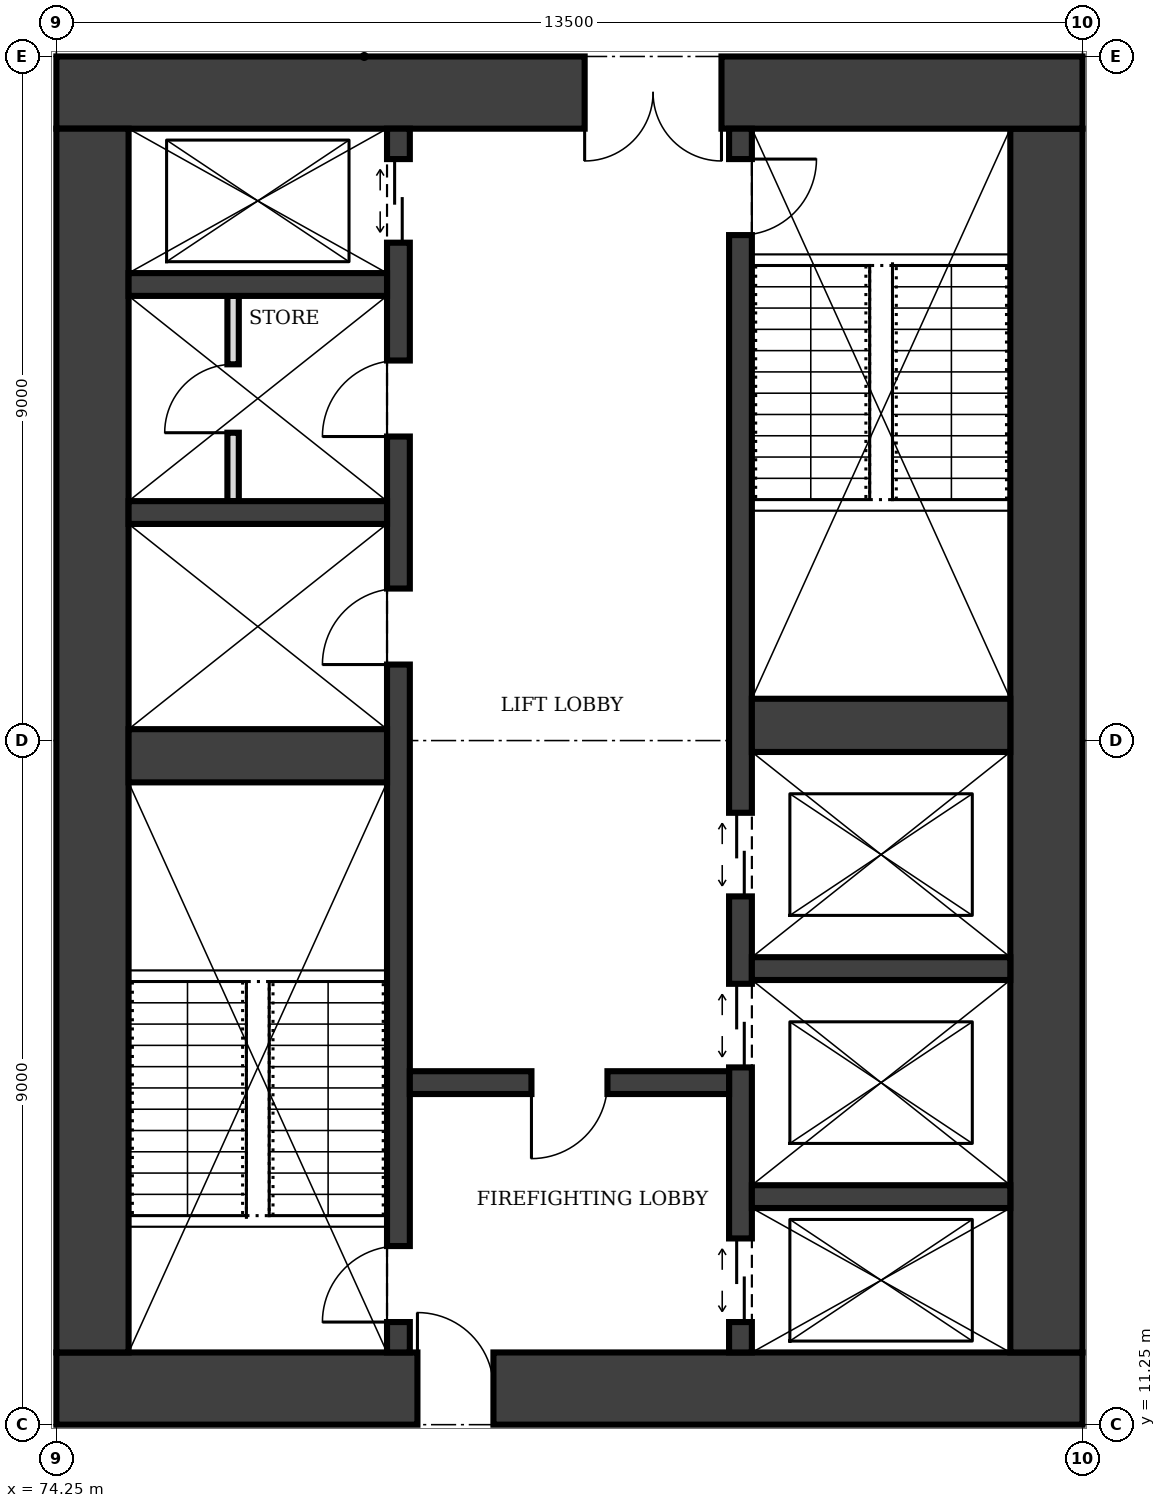
"""IFC4 building model, lengths in metres.
Left out: names, types, materials, properties, quantities, classifications, styles, units other than length and angle.
Written with IfcOpenShell. Run it as: python <this file> out.ifc"""

import sys

from ifc_helpers import new_model, si_unit, direction, frame, frame_2d, origin, place, context, subcontext, project, spatial, rectangle, extrude, element, fill, save


model = new_model("IFC4")
c1 = context("Model", 3, precision=1e-05, world=origin(), true_north=direction((0.0, 1.0)))
c2 = subcontext(c1, "Body", "Model", "MODEL_VIEW")
j1 = project(units=[si_unit("LENGTHUNIT", "METRE"), si_unit("PLANEANGLEUNIT", "RADIAN")], contexts=[c1])
p1 = place(None, origin())
s1 = spatial("IfcSite", under=j1, at=p1, CompositionType="ELEMENT")
p2 = place(p1, origin())
s2 = spatial("IfcBuilding", under=s1, at=p2, CompositionType="ELEMENT")
p3 = place(p2, frame((0.0, 0.0, 213.0)))
s3 = spatial("IfcBuildingStorey", under=s2, at=p3, CompositionType="ELEMENT", Elevation=213.0)
p4 = place(p3, frame((74.25, 11.725, 0.0), z_axis=(0.0, 0.0, 1.0), x_axis=(1.0, 0.0, 0.0)))
e1 = element("IfcWall", 1, at=p4, inside=s3, PredefinedType="SHEAR", context=c2, shape_type="SweptSolid", body=[
    extrude(rectangle(XDim=13.5, YDim=0.95, at=frame_2d((6.75, 0.0))), origin(), (0.0, 0.0, 1.0), 4.0),
])
p5 = place(p4, frame((4.75, 0.0, 0.0)))
e2 = element("IfcOpeningElement", 2, at=p5, cuts=e1, PredefinedType="OPENING", context=c2, shape_type="SweptSolid", body=[
    extrude(rectangle(XDim=1.0, YDim=2.1, at=frame_2d((0.5, 1.05))), frame((0.0, 0.485, 0.0), z_axis=(0.0, -1.0, 0.0), x_axis=(1.0, 0.0, 0.0)), (0.0, 0.0, 1.0), 0.97),
])
p6 = place(p3, frame((87.275, 12.2, 0.0), z_axis=(0.0, 0.0, 1.0), x_axis=(0.0, 1.0, 0.0)))
e3 = element("IfcWall", 3, at=p6, inside=s3, PredefinedType="SHEAR", context=c2, shape_type="SweptSolid", body=[
    extrude(rectangle(XDim=16.1, YDim=0.95, at=frame_2d((8.05, 0.0))), origin(), (0.0, 0.0, 1.0), 4.0),
])
p7 = place(p3, frame((87.75, 28.775, 0.0), z_axis=(0.0, 0.0, 1.0), x_axis=(-1.0, 0.0, 0.0)))
e4 = element("IfcWall", 4, at=p7, inside=s3, PredefinedType="SHEAR", context=c2, shape_type="SweptSolid", body=[
    extrude(rectangle(XDim=13.5, YDim=0.95, at=frame_2d((6.75, 0.0))), origin(), (0.0, 0.0, 1.0), 4.0),
])
p8 = place(p7, frame((4.75, 0.0, 0.0)))
e5 = element("IfcOpeningElement", 5, at=p8, cuts=e4, PredefinedType="OPENING", context=c2, shape_type="SweptSolid", body=[
    extrude(rectangle(XDim=1.8, YDim=2.1, at=frame_2d((0.9, 1.05))), frame((0.0, 0.485, 0.0), z_axis=(0.0, -1.0, 0.0), x_axis=(1.0, 0.0, 0.0)), (0.0, 0.0, 1.0), 0.97),
])
p9 = place(p3, frame((74.725, 28.3, 0.0), z_axis=(0.0, 0.0, 1.0), x_axis=(0.0, -1.0, 0.0)))
e6 = element("IfcWall", 6, at=p9, inside=s3, PredefinedType="SHEAR", context=c2, shape_type="SweptSolid", body=[
    extrude(rectangle(XDim=16.1, YDim=0.95, at=frame_2d((8.05, 0.0))), origin(), (0.0, 0.0, 1.0), 4.0),
])
p10 = place(p3, frame((78.75, 12.2, 0.0), z_axis=(0.0, 0.0, 1.0), x_axis=(0.0, 1.0, 0.0)))
e7 = element("IfcWall", 7, at=p10, inside=s3, PredefinedType="SHEAR", context=c2, shape_type="SweptSolid", body=[
    extrude(rectangle(XDim=16.1, YDim=0.3, at=frame_2d((8.05, 0.0))), origin(), (0.0, 0.0, 1.0), 4.0),
])
p11 = place(p10, frame((0.4, 0.0, 0.0)))
e8 = element("IfcOpeningElement", 8, at=p11, cuts=e7, PredefinedType="OPENING", context=c2, shape_type="SweptSolid", body=[
    extrude(rectangle(XDim=1.0, YDim=2.1, at=frame_2d((0.5, 1.05))), frame((0.0, 0.16, 0.0), z_axis=(0.0, -1.0, 0.0), x_axis=(1.0, 0.0, 0.0)), (0.0, 0.0, 1.0), 0.32),
])
p12 = place(p10, frame((14.6, 0.0, 0.0)))
e9 = element("IfcOpeningElement", 9, at=p12, cuts=e7, PredefinedType="OPENING", context=c2, shape_type="SweptSolid", body=[
    extrude(rectangle(XDim=1.1, YDim=2.1, at=frame_2d((0.55, 1.05))), frame((0.0, 0.16, 0.0), z_axis=(0.0, -1.0, 0.0), x_axis=(1.0, 0.0, 0.0)), (0.0, 0.0, 1.0), 0.32),
])
p13 = place(p10, frame((9.05, 0.0, 0.0)))
e10 = element("IfcOpeningElement", 10, at=p13, cuts=e7, PredefinedType="OPENING", context=c2, shape_type="SweptSolid", body=[
    extrude(rectangle(XDim=1.0, YDim=2.1, at=frame_2d((0.5, 1.05))), frame((0.0, 0.16, 0.0), z_axis=(0.0, -1.0, 0.0), x_axis=(1.0, 0.0, 0.0)), (0.0, 0.0, 1.0), 0.32),
])
p14 = place(p10, frame((12.05, 0.0, 0.0)))
e11 = element("IfcOpeningElement", 11, at=p14, cuts=e7, PredefinedType="OPENING", context=c2, shape_type="SweptSolid", body=[
    extrude(rectangle(XDim=1.0, YDim=2.1, at=frame_2d((0.5, 1.05))), frame((0.0, 0.16, 0.0), z_axis=(0.0, -1.0, 0.0), x_axis=(1.0, 0.0, 0.0)), (0.0, 0.0, 1.0), 0.32),
])
p15 = place(p3, frame((83.25, 12.2, 0.0), z_axis=(0.0, 0.0, 1.0), x_axis=(0.0, 1.0, 0.0)))
e12 = element("IfcWall", 12, at=p15, inside=s3, PredefinedType="SHEAR", context=c2, shape_type="SweptSolid", body=[
    extrude(rectangle(XDim=16.1, YDim=0.3, at=frame_2d((8.05, 0.0))), origin(), (0.0, 0.0, 1.0), 4.0),
])
p16 = place(p15, frame((14.7, 0.0, 0.0)))
e13 = element("IfcOpeningElement", 13, at=p16, cuts=e12, PredefinedType="OPENING", context=c2, shape_type="SweptSolid", body=[
    extrude(rectangle(XDim=1.0, YDim=2.1, at=frame_2d((0.5, 1.05))), frame((0.0, 0.16, 0.0), z_axis=(0.0, -1.0, 0.0), x_axis=(1.0, 0.0, 0.0)), (0.0, 0.0, 1.0), 0.32),
])
p17 = place(p15, frame((0.4, 0.0, 0.0)))
e14 = element("IfcOpeningElement", 14, at=p17, cuts=e12, PredefinedType="OPENING", context=c2, shape_type="SweptSolid", body=[
    extrude(rectangle(XDim=1.1, YDim=2.1, at=frame_2d((0.55, 1.05))), frame((0.0, 0.16, 0.0), z_axis=(0.0, -1.0, 0.0), x_axis=(1.0, 0.0, 0.0)), (0.0, 0.0, 1.0), 0.32),
])
p18 = place(p15, frame((3.75, 0.0, 0.0)))
e15 = element("IfcOpeningElement", 15, at=p18, cuts=e12, PredefinedType="OPENING", context=c2, shape_type="SweptSolid", body=[
    extrude(rectangle(XDim=1.1, YDim=2.1, at=frame_2d((0.55, 1.05))), frame((0.0, 0.16, 0.0), z_axis=(0.0, -1.0, 0.0), x_axis=(1.0, 0.0, 0.0)), (0.0, 0.0, 1.0), 0.32),
])
p19 = place(p15, frame((6.0, 0.0, 0.0)))
e16 = element("IfcOpeningElement", 16, at=p19, cuts=e12, PredefinedType="OPENING", context=c2, shape_type="SweptSolid", body=[
    extrude(rectangle(XDim=1.1, YDim=2.1, at=frame_2d((0.55, 1.05))), frame((0.0, 0.16, 0.0), z_axis=(0.0, -1.0, 0.0), x_axis=(1.0, 0.0, 0.0)), (0.0, 0.0, 1.0), 0.32),
])
p20 = place(p3, frame((75.2, 20.05, 0.0), z_axis=(0.0, 0.0, 1.0), x_axis=(1.0, 0.0, 0.0)))
e17 = element("IfcWall", 17, at=p20, inside=s3, PredefinedType="SHEAR", context=c2, shape_type="SweptSolid", body=[
    extrude(rectangle(XDim=3.4, YDim=0.7, at=frame_2d((1.7, 0.0))), origin(), (0.0, 0.0, 1.0), 4.0),
])
p21 = place(p3, frame((78.9, 15.75, 0.0), z_axis=(0.0, 0.0, 1.0), x_axis=(1.0, 0.0, 0.0)))
e18 = element("IfcWall", 18, at=p21, inside=s3, PredefinedType="SHEAR", context=c2, shape_type="SweptSolid", body=[
    extrude(rectangle(XDim=4.2, YDim=0.3, at=frame_2d((2.1, 0.0))), origin(), (0.0, 0.0, 1.0), 4.0),
])
p22 = place(p21, frame((1.6, 0.0, 0.0)))
e19 = element("IfcOpeningElement", 19, at=p22, cuts=e18, PredefinedType="OPENING", context=c2, shape_type="SweptSolid", body=[
    extrude(rectangle(XDim=1.0, YDim=2.1, at=frame_2d((0.5, 1.05))), frame((0.0, 0.16, 0.0), z_axis=(0.0, -1.0, 0.0), x_axis=(1.0, 0.0, 0.0)), (0.0, 0.0, 1.0), 0.32),
])
for number, where, z_axis, x_axis in (
    (20, (83.4, 14.25, 0.0), (0.0, 0.0, 1.0), (1.0, 0.0, 0.0)),
    (21, (83.4, 17.25, 0.0), (0.0, 0.0, 1.0), (1.0, 0.0, 0.0)),
):
    element("IfcWall", number, at=place(p3, frame(where, z_axis=z_axis, x_axis=x_axis)), inside=s3, PredefinedType="SHEAR", context=c2, shape_type="SweptSolid", body=[
        extrude(rectangle(XDim=3.4, YDim=0.3, at=frame_2d((1.7, 0.0))), origin(), (0.0, 0.0, 1.0), 4.0),
    ])
p23 = place(p3, frame((83.4, 20.45, 0.0), z_axis=(0.0, 0.0, 1.0), x_axis=(1.0, 0.0, 0.0)))
e22 = element("IfcWall", 22, at=p23, inside=s3, PredefinedType="SHEAR", context=c2, shape_type="SweptSolid", body=[
    extrude(rectangle(XDim=3.4, YDim=0.7, at=frame_2d((1.7, 0.0))), origin(), (0.0, 0.0, 1.0), 4.0),
])
for number, where, z_axis, x_axis in (
    (23, (75.2, 23.25, 0.0), (0.0, 0.0, 1.0), (1.0, 0.0, 0.0)),
    (24, (75.2, 26.25, 0.0), (0.0, 0.0, 1.0), (1.0, 0.0, 0.0)),
):
    element("IfcWall", number, at=place(p3, frame(where, z_axis=z_axis, x_axis=x_axis)), inside=s3, PredefinedType="SHEAR", context=c2, shape_type="SweptSolid", body=[
        extrude(rectangle(XDim=3.4, YDim=0.3, at=frame_2d((1.7, 0.0))), origin(), (0.0, 0.0, 1.0), 4.0),
    ])
p24 = place(p3, frame((76.575, 23.4, 0.0), z_axis=(0.0, 0.0, 1.0), x_axis=(0.0, 1.0, 0.0)))
e25 = element("IfcWall", 25, at=p24, inside=s3, PredefinedType="PARTITIONING", context=c2, shape_type="SweptSolid", body=[
    extrude(rectangle(XDim=2.7, YDim=0.15, at=frame_2d((1.35, 0.0))), origin(), (0.0, 0.0, 1.0), 3.75),
])
p25 = place(p24, frame((0.9, 0.0, 0.0)))
e26 = element("IfcOpeningElement", 26, at=p25, cuts=e25, PredefinedType="OPENING", context=c2, shape_type="SweptSolid", body=[
    extrude(rectangle(XDim=0.9, YDim=2.1, at=frame_2d((0.45, 1.05))), frame((0.0, 0.085, 0.0), z_axis=(0.0, -1.0, 0.0), x_axis=(1.0, 0.0, 0.0)), (0.0, 0.0, 1.0), 0.17),
])
p26 = place(p5, origin())
e27 = element("IfcDoor", 27, at=p26, inside=s3, OperationType="SINGLE_SWING_LEFT", PredefinedType="DOOR", context=c2, shape_type="SweptSolid", body=[
    extrude(rectangle(XDim=1.0, YDim=2.1, at=frame_2d((0.5, 1.05))), frame((0.0, 0.025, 0.0), z_axis=(0.0, -1.0, 0.0), x_axis=(1.0, 0.0, 0.0)), (0.0, 0.0, 1.0), 0.05),
])
fill(e2, e27)
p27 = place(p8, origin())
e28 = element("IfcDoor", 28, at=p27, inside=s3, OperationType="DOUBLE_DOOR_SINGLE_SWING", PredefinedType="DOOR", context=c2, shape_type="SweptSolid", body=[
    extrude(rectangle(XDim=1.8, YDim=2.1, at=frame_2d((0.9, 1.05))), frame((0.0, 0.025, 0.0), z_axis=(0.0, -1.0, 0.0), x_axis=(1.0, 0.0, 0.0)), (0.0, 0.0, 1.0), 0.05),
])
fill(e5, e28)
p28 = place(p22, frame((1.0, 0.0, 0.0), z_axis=(0.0, 0.0, 1.0), x_axis=(-1.0, 0.0, 0.0)))
e29 = element("IfcDoor", 29, at=p28, inside=s3, OperationType="SINGLE_SWING_RIGHT", PredefinedType="DOOR", context=c2, shape_type="SweptSolid", body=[
    extrude(rectangle(XDim=1.0, YDim=2.1, at=frame_2d((0.5, 1.05))), frame((0.0, 0.025, 0.0), z_axis=(0.0, -1.0, 0.0), x_axis=(1.0, 0.0, 0.0)), (0.0, 0.0, 1.0), 0.05),
])
fill(e19, e29)
p29 = place(p11, origin())
e30 = element("IfcDoor", 30, at=p29, inside=s3, OperationType="SINGLE_SWING_LEFT", PredefinedType="DOOR", context=c2, shape_type="SweptSolid", body=[
    extrude(rectangle(XDim=1.0, YDim=2.1, at=frame_2d((0.5, 1.05))), frame((0.0, 0.025, 0.0), z_axis=(0.0, -1.0, 0.0), x_axis=(1.0, 0.0, 0.0)), (0.0, 0.0, 1.0), 0.05),
])
fill(e8, e30)
p30 = place(p16, frame((1.0, 0.0, 0.0), z_axis=(0.0, 0.0, 1.0), x_axis=(-1.0, 0.0, 0.0)))
e31 = element("IfcDoor", 31, at=p30, inside=s3, OperationType="SINGLE_SWING_LEFT", PredefinedType="DOOR", context=c2, shape_type="SweptSolid", body=[
    extrude(rectangle(XDim=1.0, YDim=2.1, at=frame_2d((0.5, 1.05))), frame((0.0, 0.025, 0.0), z_axis=(0.0, -1.0, 0.0), x_axis=(1.0, 0.0, 0.0)), (0.0, 0.0, 1.0), 0.05),
])
fill(e13, e31)
p31 = place(p17, origin())
e32 = element("IfcDoor", 32, at=p31, inside=s3, OperationType="DOUBLE_DOOR_SLIDING", PredefinedType="DOOR", context=c2, shape_type="SweptSolid", body=[
    extrude(rectangle(XDim=1.1, YDim=2.1, at=frame_2d((0.55, 1.05))), frame((0.0, 0.025, 0.0), z_axis=(0.0, -1.0, 0.0), x_axis=(1.0, 0.0, 0.0)), (0.0, 0.0, 1.0), 0.05),
])
fill(e14, e32)
p32 = place(p12, origin())
e33 = element("IfcDoor", 33, at=p32, inside=s3, OperationType="DOUBLE_DOOR_SLIDING", PredefinedType="DOOR", context=c2, shape_type="SweptSolid", body=[
    extrude(rectangle(XDim=1.1, YDim=2.1, at=frame_2d((0.55, 1.05))), frame((0.0, 0.025, 0.0), z_axis=(0.0, -1.0, 0.0), x_axis=(1.0, 0.0, 0.0)), (0.0, 0.0, 1.0), 0.05),
])
fill(e9, e33)
p33 = place(p18, origin())
e34 = element("IfcDoor", 34, at=p33, inside=s3, OperationType="DOUBLE_DOOR_SLIDING", PredefinedType="DOOR", context=c2, shape_type="SweptSolid", body=[
    extrude(rectangle(XDim=1.1, YDim=2.1, at=frame_2d((0.55, 1.05))), frame((0.0, 0.025, 0.0), z_axis=(0.0, -1.0, 0.0), x_axis=(1.0, 0.0, 0.0)), (0.0, 0.0, 1.0), 0.05),
])
fill(e15, e34)
p34 = place(p19, origin())
e35 = element("IfcDoor", 35, at=p34, inside=s3, OperationType="DOUBLE_DOOR_SLIDING", PredefinedType="DOOR", context=c2, shape_type="SweptSolid", body=[
    extrude(rectangle(XDim=1.1, YDim=2.1, at=frame_2d((0.55, 1.05))), frame((0.0, 0.025, 0.0), z_axis=(0.0, -1.0, 0.0), x_axis=(1.0, 0.0, 0.0)), (0.0, 0.0, 1.0), 0.05),
])
fill(e16, e35)
p35 = place(p13, origin())
e36 = element("IfcDoor", 36, at=p35, inside=s3, OperationType="SINGLE_SWING_LEFT", PredefinedType="DOOR", context=c2, shape_type="SweptSolid", body=[
    extrude(rectangle(XDim=1.0, YDim=2.1, at=frame_2d((0.5, 1.05))), frame((0.0, 0.025, 0.0), z_axis=(0.0, -1.0, 0.0), x_axis=(1.0, 0.0, 0.0)), (0.0, 0.0, 1.0), 0.05),
])
fill(e10, e36)
p36 = place(p14, origin())
e37 = element("IfcDoor", 37, at=p36, inside=s3, OperationType="SINGLE_SWING_LEFT", PredefinedType="DOOR", context=c2, shape_type="SweptSolid", body=[
    extrude(rectangle(XDim=1.0, YDim=2.1, at=frame_2d((0.5, 1.05))), frame((0.0, 0.025, 0.0), z_axis=(0.0, -1.0, 0.0), x_axis=(1.0, 0.0, 0.0)), (0.0, 0.0, 1.0), 0.05),
])
fill(e11, e37)
p37 = place(p25, origin())
e38 = element("IfcDoor", 38, at=p37, inside=s3, OperationType="SINGLE_SWING_LEFT", PredefinedType="DOOR", context=c2, shape_type="SweptSolid", body=[
    extrude(rectangle(XDim=0.9, YDim=2.1, at=frame_2d((0.45, 1.05))), frame((0.0, 0.025, 0.0), z_axis=(0.0, -1.0, 0.0), x_axis=(1.0, 0.0, 0.0)), (0.0, 0.0, 1.0), 0.05),
])
fill(e26, e38)
save(model, sys.argv[1])
